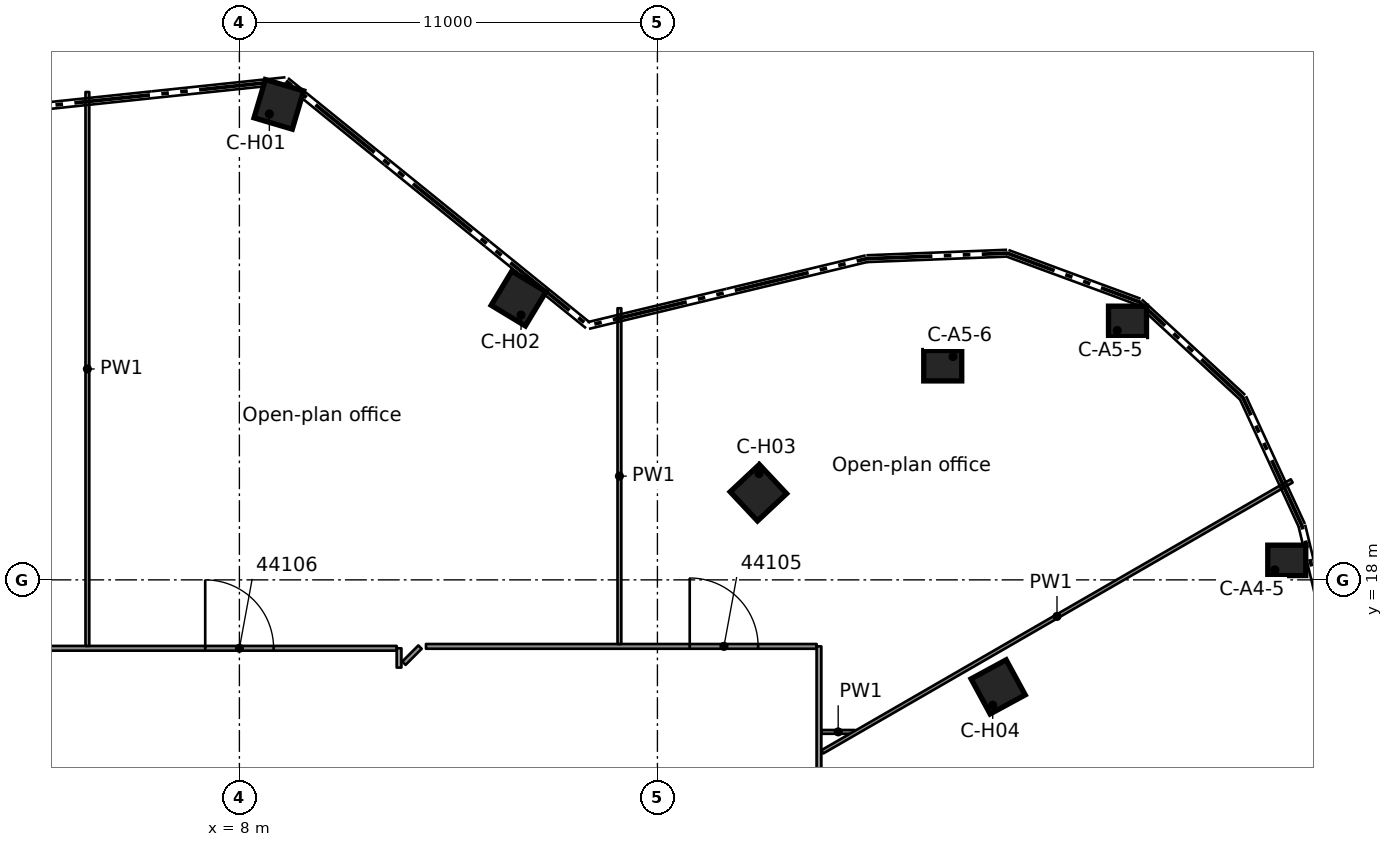
"""IFC4 building model, lengths in metres.
Left out: names, types, materials, properties, quantities, classifications, styles, units other than length and angle.
Written with IfcOpenShell. Run it as: python <this file> out.ifc"""

import sys

from ifc_helpers import new_model, si_unit, direction, frame, frame_2d, origin, origin_2d, place, context, subcontext, project, spatial, rectangle, extrude, element, fill, save


model = new_model("IFC4")
c1 = context("Model", 3, precision=1e-05, world=origin(), true_north=direction((0.0, 1.0)))
c2 = subcontext(c1, "Body", "Model", "MODEL_VIEW")
j1 = project(units=[si_unit("LENGTHUNIT", "METRE"), si_unit("PLANEANGLEUNIT", "RADIAN")], contexts=[c1])
p1 = place(None, origin())
s1 = spatial("IfcSite", under=j1, at=p1, CompositionType="ELEMENT")
p2 = place(p1, origin())
s2 = spatial("IfcBuilding", under=s1, at=p2, CompositionType="ELEMENT")
p3 = place(p2, frame((0.0, 0.0, 217.5)))
s3 = spatial("IfcBuildingStorey", under=s2, at=p3, CompositionType="ELEMENT", Elevation=217.5)
for number, where, z_axis, x_axis in (
    (1, (35.561, 18.513, 0.0), (0.0, 0.0, 1.0), (1.0, 0.0, 0.0)),
    (2, (31.37, 24.802, 0.0), (0.0, 0.0, 1.0), (1.0, 0.0, 0.0)),
    (3, (26.508, 23.635, 0.0), (0.0, 0.0, 1.0), (1.0, 0.0, 0.0)),
):
    element("IfcColumn", number, at=place(p3, frame(where, z_axis=z_axis, x_axis=x_axis)), inside=s3, PredefinedType="COLUMN", context=c2, shape_type="SweptSolid", body=[
        extrude(rectangle(XDim=1.0, YDim=0.8, at=origin_2d()), origin(), (0.0, 0.0, 1.0), 3.5),
    ])
for number, where, z_axis, x_axis in (
    (4, (9.038, 30.512, 0.0), (0.0, 0.0, 1.0), (0.284, 0.959, 0.0)),
    (5, (15.347, 25.403, 0.0), (0.0, 0.0, 1.0), (0.517, 0.856, 0.0)),
    (6, (21.657, 20.293, 0.0), (0.0, 0.0, 1.0), (0.73, 0.684, 0.0)),
    (7, (27.966, 15.184, 0.0), (0.0, 0.0, 1.0), (0.879, 0.477, 0.0)),
):
    element("IfcColumn", number, at=place(p3, frame(where, z_axis=z_axis, x_axis=x_axis)), inside=s3, PredefinedType="COLUMN", context=c2, shape_type="SweptSolid", body=[
        extrude(rectangle(XDim=1.05, YDim=1.05, at=origin_2d()), origin(), (0.0, 0.0, 1.0), 3.5),
    ])
p4 = place(p3, frame((23.314, 14.0, 0.0), z_axis=(0.0, 0.0, 1.0), x_axis=(1.0, 0.0, 0.0)))
e8 = element("IfcWall", 8, at=p4, inside=s3, PredefinedType="PARTITIONING", context=c2, shape_type="SweptSolid", body=[
    extrude(rectangle(XDim=0.885, YDim=0.1, at=frame_2d((0.442, 0.0))), origin(), (0.0, 0.0, 1.0), 3.06),
])
p5 = place(p3, frame((-12.137, 16.2, 0.0), z_axis=(0.0, 0.0, 1.0), x_axis=(1.0, 0.0, 0.0)))
e9 = element("IfcWall", 9, at=p5, inside=s3, PredefinedType="PARTITIONING", context=c2, shape_type="SweptSolid", body=[
    extrude(rectangle(XDim=24.276, YDim=0.125, at=frame_2d((12.138, 0.0))), origin(), (0.0, 0.0, 1.0), 3.06),
])
p6 = place(p5, frame((19.238, 0.0, 0.0)))
e10 = element("IfcOpeningElement", 10, at=p6, cuts=e9, PredefinedType="OPENING", context=c2, shape_type="SweptSolid", body=[
    extrude(rectangle(XDim=1.8, YDim=2.1, at=frame_2d((0.9, 1.05))), frame((0.0, 0.073, 0.0), z_axis=(0.0, -1.0, 0.0), x_axis=(1.0, 0.0, 0.0)), (0.0, 0.0, 1.0), 0.145),
])
p7 = place(p5, frame((11.488, 0.0, 0.0)))
e11 = element("IfcOpeningElement", 11, at=p7, cuts=e9, PredefinedType="OPENING", context=c2, shape_type="SweptSolid", body=[
    extrude(rectangle(XDim=1.1, YDim=2.1, at=frame_2d((0.55, 1.05))), frame((0.0, 0.073, 0.0), z_axis=(0.0, -1.0, 0.0), x_axis=(1.0, 0.0, 0.0)), (0.0, 0.0, 1.0), 0.145),
])
p8 = place(p5, frame((3.038, 0.0, 0.0)))
e12 = element("IfcOpeningElement", 12, at=p8, cuts=e9, PredefinedType="OPENING", context=c2, shape_type="SweptSolid", body=[
    extrude(rectangle(XDim=1.8, YDim=2.1, at=frame_2d((0.9, 1.05))), frame((0.0, 0.073, 0.0), z_axis=(0.0, -1.0, 0.0), x_axis=(1.0, 0.0, 0.0)), (0.0, 0.0, 1.0), 0.145),
])
p9 = place(p3, frame((12.91, 16.25, 0.0), z_axis=(0.0, 0.0, 1.0), x_axis=(1.0, 0.0, 0.0)))
e13 = element("IfcWall", 13, at=p9, inside=s3, PredefinedType="PARTITIONING", context=c2, shape_type="SweptSolid", body=[
    extrude(rectangle(XDim=10.279, YDim=0.125, at=frame_2d((5.14, 0.0))), origin(), (0.0, 0.0, 1.0), 3.06),
])
p10 = place(p9, frame((6.94, 0.0, 0.0)))
e14 = element("IfcOpeningElement", 14, at=p10, cuts=e13, PredefinedType="OPENING", context=c2, shape_type="SweptSolid", body=[
    extrude(rectangle(XDim=1.8, YDim=2.1, at=frame_2d((0.9, 1.05))), frame((0.0, 0.073, 0.0), z_axis=(0.0, -1.0, 0.0), x_axis=(1.0, 0.0, 0.0)), (0.0, 0.0, 1.0), 0.145),
])
p11 = place(p3, frame((23.338, 13.474, 0.0), z_axis=(0.0, 0.0, 1.0), x_axis=(0.866090390972, 0.499887421992, 0.0)))
e15 = element("IfcWall", 15, at=p11, inside=s3, PredefinedType="PARTITIONING", context=c2, shape_type="SweptSolid", body=[
    extrude(rectangle(XDim=14.263, YDim=0.1, at=frame_2d((7.131, 0.0))), origin(), (0.0, 0.0, 1.0), 3.06),
])
p12 = place(p3, frame((12.329, 15.807, 0.0), z_axis=(0.0, 0.0, 1.0), x_axis=(0.706903150737, 0.707310353012, 0.0)))
e16 = element("IfcWall", 16, at=p12, inside=s3, PredefinedType="PARTITIONING", context=c2, shape_type="SweptSolid", body=[
    extrude(rectangle(XDim=0.6, YDim=0.125, at=frame_2d((0.3, 0.0))), origin(), (0.0, 0.0, 1.0), 3.06),
])
p13 = place(p3, frame((23.251, 16.25, 0.0), z_axis=(0.0, 0.0, 1.0), x_axis=(0.0, -1.0, 0.0)))
e17 = element("IfcWall", 17, at=p13, inside=s3, PredefinedType="PARTITIONING", context=c2, shape_type="SweptSolid", body=[
    extrude(rectangle(XDim=31.631, YDim=0.125, at=frame_2d((15.815, 0.0))), origin(), (0.0, 0.0, 1.0), 3.06),
])
p14 = place(p13, frame((12.426, 0.0, 0.0)))
e18 = element("IfcOpeningElement", 18, at=p14, cuts=e17, PredefinedType="OPENING", context=c2, shape_type="SweptSolid", body=[
    extrude(rectangle(XDim=1.8, YDim=2.1, at=frame_2d((0.9, 1.05))), frame((0.0, 0.073, 0.0), z_axis=(0.0, -1.0, 0.0), x_axis=(1.0, 0.0, 0.0)), (0.0, 0.0, 1.0), 0.145),
])
p15 = place(p13, frame((23.85, 0.0, 0.0)))
e19 = element("IfcOpeningElement", 19, at=p15, cuts=e17, PredefinedType="OPENING", context=c2, shape_type="SweptSolid", body=[
    extrude(rectangle(XDim=0.9, YDim=2.1, at=frame_2d((0.45, 1.05))), frame((0.0, 0.073, 0.0), z_axis=(0.0, -1.0, 0.0), x_axis=(1.0, 0.0, 0.0)), (0.0, 0.0, 1.0), 0.145),
])
p16 = place(p3, frame((18.0, 16.312, 0.0), z_axis=(0.0, 0.0, 1.0), x_axis=(0.0, 1.0, 0.0)))
e20 = element("IfcWall", 20, at=p16, inside=s3, PredefinedType="PARTITIONING", context=c2, shape_type="SweptSolid", body=[
    extrude(rectangle(XDim=8.835, YDim=0.1, at=frame_2d((4.417, 0.0))), origin(), (0.0, 0.0, 1.0), 3.06),
])
p17 = place(p3, frame((12.201, 15.692, 0.0), z_axis=(0.0, 0.0, 1.0), x_axis=(0.0, 1.0, 0.0)))
e21 = element("IfcWall", 21, at=p17, inside=s3, PredefinedType="PARTITIONING", context=c2, shape_type="SweptSolid", body=[
    extrude(rectangle(XDim=0.508, YDim=0.125, at=frame_2d((0.254, 0.0))), origin(), (0.0, 0.0, 1.0), 3.06),
])
p18 = place(p3, frame((4.0, 16.262, 0.0), z_axis=(0.0, 0.0, 1.0), x_axis=(0.0, 1.0, 0.0)))
e22 = element("IfcWall", 22, at=p18, inside=s3, PredefinedType="PARTITIONING", context=c2, shape_type="SweptSolid", body=[
    extrude(rectangle(XDim=14.575, YDim=0.1, at=frame_2d((7.288, 0.0))), origin(), (0.0, 0.0, 1.0), 3.06),
])
p19 = place(p10, origin())
e23 = element("IfcDoor", 23, at=p19, inside=s3, OperationType="DOUBLE_DOOR_SINGLE_SWING", PredefinedType="DOOR", context=c2, shape_type="SweptSolid", body=[
    extrude(rectangle(XDim=1.8, YDim=2.1, at=frame_2d((0.9, 1.05))), frame((0.0, 0.025, 0.0), z_axis=(0.0, -1.0, 0.0), x_axis=(1.0, 0.0, 0.0)), (0.0, 0.0, 1.0), 0.05),
])
fill(e14, e23)
p20 = place(p6, origin())
e24 = element("IfcDoor", 24, at=p20, inside=s3, OperationType="DOUBLE_DOOR_SINGLE_SWING", PredefinedType="DOOR", context=c2, shape_type="SweptSolid", body=[
    extrude(rectangle(XDim=1.8, YDim=2.1, at=frame_2d((0.9, 1.05))), frame((0.0, 0.025, 0.0), z_axis=(0.0, -1.0, 0.0), x_axis=(1.0, 0.0, 0.0)), (0.0, 0.0, 1.0), 0.05),
])
fill(e10, e24)
save(model, sys.argv[1])
